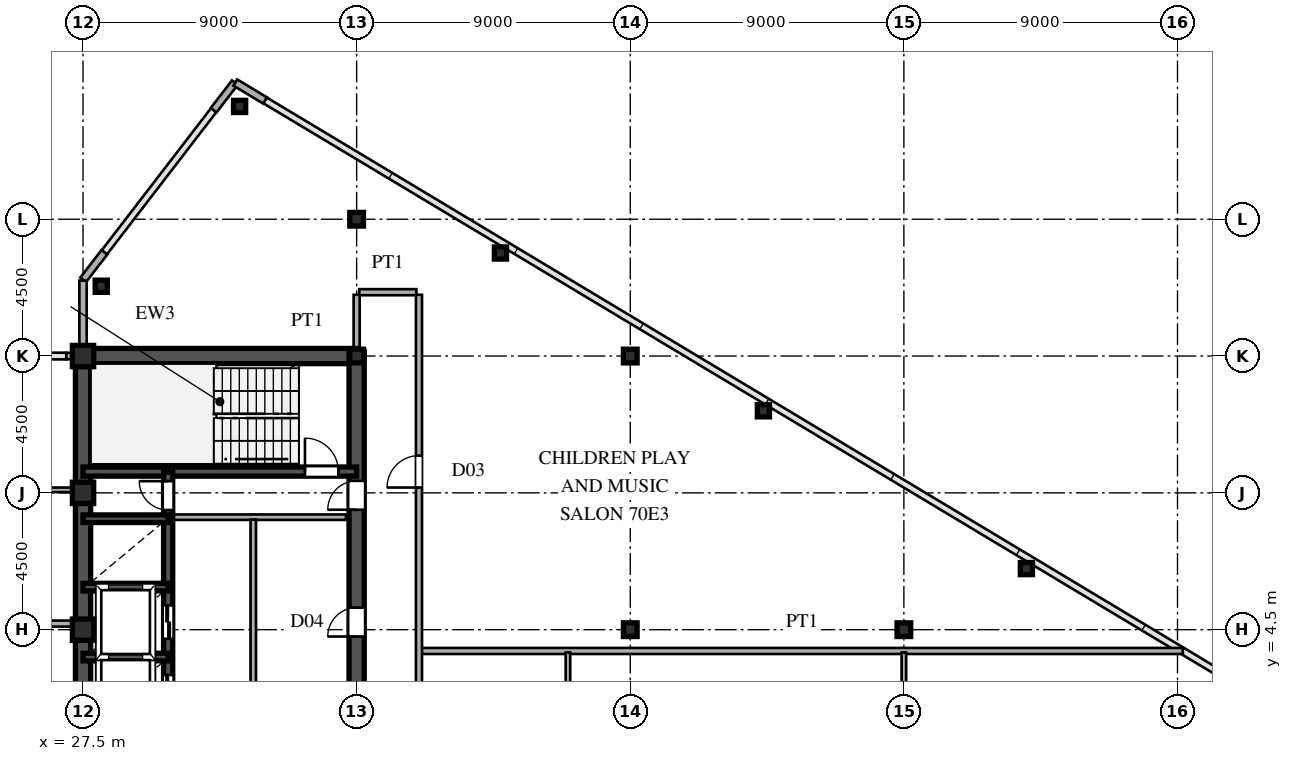
"""IFC4 building model, lengths in metres.
Left out: names, types, materials, properties, quantities, classifications, styles, units other than length and angle.
Written with IfcOpenShell. Run it as: python <this file> out.ifc"""

import sys

from ifc_helpers import new_model, si_unit, direction, frame, frame_2d, origin, origin_2d, place, context, subcontext, project, spatial, rectangle, hollow_rectangle, i_section, extrude, source, transform, mapped, element, fill, save


model = new_model("IFC4")
c1 = context("Model", 3, precision=1e-05, world=origin(), true_north=direction((0.0, 1.0)))
c2 = subcontext(c1, "Body", "Model", "MODEL_VIEW")
j1 = project(units=[si_unit("LENGTHUNIT", "METRE"), si_unit("PLANEANGLEUNIT", "RADIAN")], contexts=[c1])
p1 = place(None, origin())
s1 = spatial("IfcSite", under=j1, at=p1, CompositionType="ELEMENT")
p2 = place(p1, origin())
s2 = spatial("IfcBuilding", under=s1, at=p2, CompositionType="ELEMENT")
p3 = place(p2, frame((0.0, 0.0, 265.65)))
s3 = spatial("IfcBuildingStorey", under=s2, at=p3, CompositionType="ELEMENT", Elevation=265.65)
m1 = source(origin(), c2, "Body", "SweptSolid", [
    extrude(hollow_rectangle(XDim=0.7, YDim=0.7, WallThickness=0.03, at=origin_2d()), origin(), (0.0, 0.0, 1.0), 3.75),
])
for number, where, z_axis, x_axis in (
    (1, (27.5, 4.5, 0.0), (0.0, 0.0, 1.0), (1.0, 0.0, 0.0)),
    (2, (27.5, 9.0, 0.0), (0.0, 0.0, 1.0), (1.0, 0.0, 0.0)),
    (3, (27.5, 13.5, 0.0), (0.0, 0.0, 1.0), (1.0, 0.0, 0.0)),
):
    element("IfcColumn", number, at=place(p3, frame(where, z_axis=z_axis, x_axis=x_axis)), inside=s3, PredefinedType="COLUMN", context=c2, shape_type="MappedRepresentation", body=[
        mapped(m1, transform((0.0, 0.0, 0.0), scale=1.0)),
    ])
m2 = source(origin(), c2, "Body", "SweptSolid", [
    extrude(i_section(OverallWidth=0.45, OverallDepth=0.45, WebThickness=0.016, FlangeThickness=0.025, at=origin_2d()), origin(), (0.0, 0.0, 1.0), 3.75),
])
for number, where, z_axis, x_axis in (
    (4, (36.5, 13.5, 0.0), (0.0, 0.0, 1.0), (1.0, 0.0, 0.0)),
    (5, (36.5, 18.0, 0.0), (0.0, 0.0, 1.0), (1.0, 0.0, 0.0)),
    (6, (45.5, 4.5, 0.0), (0.0, 0.0, 1.0), (1.0, 0.0, 0.0)),
    (7, (45.5, 13.5, 0.0), (0.0, 0.0, 1.0), (1.0, 0.0, 0.0)),
    (8, (54.5, 4.5, 0.0), (0.0, 0.0, 1.0), (1.0, 0.0, 0.0)),
):
    element("IfcColumn", number, at=place(p3, frame(where, z_axis=z_axis, x_axis=x_axis)), inside=s3, PredefinedType="COLUMN", context=c2, shape_type="MappedRepresentation", body=[
        mapped(m2, transform((0.0, 0.0, 0.0), scale=1.0)),
    ])
m3 = source(origin(), c2, "Body", "SweptSolid", [
    extrude(hollow_rectangle(XDim=0.4, YDim=0.4, WallThickness=0.016, at=origin_2d()), origin(), (0.0, 0.0, 1.0), 3.75),
])
for number, where, z_axis, x_axis in (
    (9, (32.65, 21.71, 0.0), (0.0, 0.0, 1.0), (1.0, 0.0, 0.0)),
    (10, (28.1, 15.796, 0.0), (0.0, 0.0, 1.0), (1.0, 0.0, 0.0)),
    (11, (41.23, 16.889, 0.0), (0.0, 0.0, 1.0), (1.0, 0.0, 0.0)),
    (12, (49.88, 11.699, 0.0), (0.0, 0.0, 1.0), (1.0, 0.0, 0.0)),
    (13, (58.53, 6.509, 0.0), (0.0, 0.0, 1.0), (1.0, 0.0, 0.0)),
):
    element("IfcColumn", number, at=place(p3, frame(where, z_axis=z_axis, x_axis=x_axis)), inside=s3, PredefinedType="COLUMN", context=c2, shape_type="MappedRepresentation", body=[
        mapped(m3, transform((0.0, 0.0, 0.0), scale=1.0)),
    ])
for number, where, z_axis, x_axis in (
    (14, (33.486, 21.908, 0.0), (0.0, 0.0, 1.0), (-0.857, 0.515, 0.0)),
    (15, (32.494, 22.492, 0.0), (0.0, 0.0, 1.0), (-0.61, -0.793, 0.0)),
    (16, (28.201, 16.912, 0.0), (0.0, 0.0, 1.0), (-0.61, -0.793, 0.0)),
):
    element("IfcWall", number, at=place(p3, frame(where, z_axis=z_axis, x_axis=x_axis)), inside=s3, PredefinedType="SOLIDWALL", context=c2, shape_type="SweptSolid", body=[
        extrude(rectangle(XDim=1.14, YDim=0.24, at=frame_2d((0.57, 0.0))), origin(), (0.0, 0.0, 1.0), 3.49),
    ])
p4 = place(p3, frame((27.5, 13.755, 0.0), z_axis=(0.0, 0.0, 1.0), x_axis=(0.0, 1.0, 0.0)))
e17 = element("IfcWall", 17, at=p4, inside=s3, PredefinedType="SOLIDWALL", context=c2, shape_type="SweptSolid", body=[
    extrude(rectangle(XDim=0.62, YDim=0.24, at=frame_2d((0.31, 0.0))), origin(), (0.0, 0.0, 1.0), 2.99),
])
p5 = place(p3, frame((27.5, 14.375, 0.0), z_axis=(0.0, 0.0, 1.0), x_axis=(0.0, 1.0, 0.0)))
e18 = element("IfcWall", 18, at=p5, inside=s3, PredefinedType="SOLIDWALL", context=c2, shape_type="SweptSolid", body=[
    extrude(rectangle(XDim=1.605, YDim=0.24, at=frame_2d((0.803, 0.0))), origin(), (0.0, 0.0, 1.0), 3.49),
])
p6 = place(p3, frame((26.95, 13.5, 0.0), z_axis=(0.0, 0.0, 1.0), x_axis=(1.0, 0.0, 0.0)))
e19 = element("IfcWall", 19, at=p6, inside=s3, PredefinedType="SOLIDWALL", context=c2, shape_type="SweptSolid", body=[
    extrude(rectangle(XDim=0.54, YDim=0.21, at=frame_2d((0.27, 0.0))), origin(), (0.0, 0.0, 1.0), 2.99),
])
p7 = place(p3, frame((27.5, 1.3, 0.0), z_axis=(0.0, 0.0, 1.0), x_axis=(0.0, 1.0, 0.0)))
e20 = element("IfcWall", 20, at=p7, inside=s3, PredefinedType="SHEAR", context=c2, shape_type="SweptSolid", body=[
    extrude(rectangle(XDim=12.2, YDim=0.5, at=frame_2d((6.1, 0.0))), origin(), (0.0, 0.0, 1.0), 3.49),
])
p8 = place(p3, frame((27.5, 13.5, 0.0), z_axis=(0.0, 0.0, 1.0), x_axis=(1.0, 0.0, 0.0)))
e21 = element("IfcWall", 21, at=p8, inside=s3, PredefinedType="SHEAR", context=c2, shape_type="SweptSolid", body=[
    extrude(rectangle(XDim=9.0, YDim=0.5, at=frame_2d((4.5, 0.0))), origin(), (0.0, 0.0, 1.0), 3.49),
])
p9 = place(p3, frame((36.5, 8.2, 0.0), z_axis=(0.0, 0.0, 1.0), x_axis=(0.0, 1.0, 0.0)))
e22 = element("IfcWall", 22, at=p9, inside=s3, PredefinedType="SHEAR", context=c2, shape_type="SweptSolid", body=[
    extrude(rectangle(XDim=5.45, YDim=0.5, at=frame_2d((2.725, 0.0))), origin(), (0.0, 0.0, 1.0), 3.49),
])
p10 = place(p9, frame((0.245, 0.0, 0.0)))
e23 = element("IfcOpeningElement", 23, at=p10, cuts=e22, PredefinedType="OPENING", context=c2, shape_type="SweptSolid", body=[
    extrude(rectangle(XDim=0.95, YDim=2.15, at=frame_2d((0.475, 1.075))), frame((0.0, 0.26, 0.0), z_axis=(0.0, -1.0, 0.0), x_axis=(1.0, 0.0, 0.0)), (0.0, 0.0, 1.0), 0.52),
])
p11 = place(p3, frame((36.5, 1.3, 0.0), z_axis=(0.0, 0.0, 1.0), x_axis=(0.0, 1.0, 0.0)))
e24 = element("IfcWall", 24, at=p11, inside=s3, PredefinedType="SHEAR", context=c2, shape_type="SweptSolid", body=[
    extrude(rectangle(XDim=6.9, YDim=0.5, at=frame_2d((3.45, 0.0))), origin(), (0.0, 0.0, 1.0), 3.49),
])
p12 = place(p11, frame((2.975, 0.0, 0.0)))
e25 = element("IfcOpeningElement", 25, at=p12, cuts=e24, PredefinedType="OPENING", context=c2, shape_type="SweptSolid", body=[
    extrude(rectangle(XDim=0.95, YDim=2.15, at=frame_2d((0.475, 1.075))), frame((0.0, 0.26, 0.0), z_axis=(0.0, -1.0, 0.0), x_axis=(1.0, 0.0, 0.0)), (0.0, 0.0, 1.0), 0.52),
])
p13 = place(p3, frame((27.5, 9.7, 0.0), z_axis=(0.0, 0.0, 1.0), x_axis=(1.0, 0.0, 0.0)))
e26 = element("IfcWall", 26, at=p13, inside=s3, PredefinedType="SHEAR", context=c2, shape_type="SweptSolid", body=[
    extrude(rectangle(XDim=9.0, YDim=0.3, at=frame_2d((4.5, 0.0))), origin(), (0.0, 0.0, 1.0), 3.49),
])
p14 = place(p13, frame((7.3, 0.0, 0.0)))
e27 = element("IfcOpeningElement", 27, at=p14, cuts=e26, PredefinedType="OPENING", context=c2, shape_type="SweptSolid", body=[
    extrude(rectangle(XDim=1.1, YDim=2.2, at=frame_2d((0.55, 1.1))), frame((0.0, 0.16, 0.0), z_axis=(0.0, -1.0, 0.0), x_axis=(1.0, 0.0, 0.0)), (0.0, 0.0, 1.0), 0.32),
])
for number, where, z_axis, x_axis in (
    (28, (27.5, 3.6, 0.0), (0.0, 0.0, 1.0), (1.0, 0.0, 0.0)),
    (29, (27.5, 5.9, 0.0), (0.0, 0.0, 1.0), (1.0, 0.0, 0.0)),
    (30, (27.5, 8.15, 0.0), (0.0, 0.0, 1.0), (1.0, 0.0, 0.0)),
):
    element("IfcWall", number, at=place(p3, frame(where, z_axis=z_axis, x_axis=x_axis)), inside=s3, PredefinedType="SHEAR", context=c2, shape_type="SweptSolid", body=[
        extrude(rectangle(XDim=2.8, YDim=0.25, at=frame_2d((1.4, 0.0))), origin(), (0.0, 0.0, 1.0), 3.49),
    ])
p15 = place(p3, frame((30.3, 1.32, 0.0), z_axis=(0.0, 0.0, 1.0), x_axis=(0.0, 1.0, 0.0)))
e31 = element("IfcWall", 31, at=p15, inside=s3, PredefinedType="SHEAR", context=c2, shape_type="SweptSolid", body=[
    extrude(rectangle(XDim=2.28, YDim=0.3, at=frame_2d((1.14, 0.0))), origin(), (0.0, 0.0, 1.0), 3.49),
])
p16 = place(p15, frame((0.59, 0.0, 0.0)))
e32 = element("IfcOpeningElement", 32, at=p16, cuts=e31, PredefinedType="OPENING", context=c2, shape_type="SweptSolid", body=[
    extrude(rectangle(XDim=1.1, YDim=2.2, at=frame_2d((0.55, 1.1))), frame((0.0, 0.16, 0.0), z_axis=(0.0, -1.0, 0.0), x_axis=(1.0, 0.0, 0.0)), (0.0, 0.0, 1.0), 0.32),
])
p17 = place(p3, frame((30.3, 3.6, 0.0), z_axis=(0.0, 0.0, 1.0), x_axis=(0.0, 1.0, 0.0)))
e33 = element("IfcWall", 33, at=p17, inside=s3, PredefinedType="SHEAR", context=c2, shape_type="SweptSolid", body=[
    extrude(rectangle(XDim=2.3, YDim=0.3, at=frame_2d((1.15, 0.0))), origin(), (0.0, 0.0, 1.0), 3.49),
])
p18 = place(p17, frame((0.6, 0.0, 0.0)))
e34 = element("IfcOpeningElement", 34, at=p18, cuts=e33, PredefinedType="OPENING", context=c2, shape_type="SweptSolid", body=[
    extrude(rectangle(XDim=1.1, YDim=2.2, at=frame_2d((0.55, 1.1))), frame((0.0, 0.16, 0.0), z_axis=(0.0, -1.0, 0.0), x_axis=(1.0, 0.0, 0.0)), (0.0, 0.0, 1.0), 0.32),
])
p19 = place(p3, frame((30.3, 5.9, 0.0), z_axis=(0.0, 0.0, 1.0), x_axis=(0.0, 1.0, 0.0)))
e35 = element("IfcWall", 35, at=p19, inside=s3, PredefinedType="SHEAR", context=c2, shape_type="SweptSolid", body=[
    extrude(rectangle(XDim=2.25, YDim=0.3, at=frame_2d((1.125, 0.0))), origin(), (0.0, 0.0, 1.0), 3.49),
])
p20 = place(p3, frame((30.3, 8.15, 0.0), z_axis=(0.0, 0.0, 1.0), x_axis=(0.0, 1.0, 0.0)))
e36 = element("IfcWall", 36, at=p20, inside=s3, PredefinedType="SHEAR", context=c2, shape_type="SweptSolid", body=[
    extrude(rectangle(XDim=1.53, YDim=0.3, at=frame_2d((0.765, 0.0))), origin(), (0.0, 0.0, 1.0), 3.49),
])
p21 = place(p20, frame((0.285, 0.0, 0.0)))
e37 = element("IfcOpeningElement", 37, at=p21, cuts=e36, PredefinedType="OPENING", context=c2, shape_type="SweptSolid", body=[
    extrude(rectangle(XDim=0.95, YDim=2.15, at=frame_2d((0.475, 1.075))), frame((0.0, 0.16, 0.0), z_axis=(0.0, -1.0, 0.0), x_axis=(1.0, 0.0, 0.0)), (0.0, 0.0, 1.0), 0.32),
])
p22 = place(p3, frame((30.45, 8.2, 0.0), z_axis=(0.0, 0.0, 1.0), x_axis=(1.0, 0.0, 0.0)))
e38 = element("IfcWall", 38, at=p22, inside=s3, PredefinedType="PARTITIONING", context=c2, shape_type="SweptSolid", body=[
    extrude(rectangle(XDim=5.7, YDim=0.18, at=frame_2d((2.85, 0.0))), origin(), (0.0, 0.0, 1.0), 3.49),
])
p23 = place(p3, frame((33.1, 1.38, 0.0), z_axis=(0.0, 0.0, 1.0), x_axis=(0.0, 1.0, 0.0)))
e39 = element("IfcWall", 39, at=p23, inside=s3, PredefinedType="PARTITIONING", context=c2, shape_type="SweptSolid", body=[
    extrude(rectangle(XDim=6.74, YDim=0.18, at=frame_2d((3.37, 0.0))), origin(), (0.0, 0.0, 1.0), 3.49),
])
p24 = place(p3, frame((38.63, 3.8, 0.0), z_axis=(0.0, 0.0, 1.0), x_axis=(1.0, 0.0, 0.0)))
e40 = element("IfcWall", 40, at=p24, inside=s3, PredefinedType="PARTITIONING", context=c2, shape_type="SweptSolid", body=[
    extrude(rectangle(XDim=25.046, YDim=0.2, at=frame_2d((12.523, 0.0))), origin(), (0.0, 0.0, 1.0), 3.49),
])
p25 = place(p3, frame((-27.245, 4.7, 0.0), z_axis=(0.0, 0.0, 1.0), x_axis=(1.0, 0.0, 0.0)))
e41 = element("IfcWall", 41, at=p25, inside=s3, PredefinedType="PARTITIONING", context=c2, shape_type="SweptSolid", body=[
    extrude(rectangle(XDim=54.49, YDim=0.2, at=frame_2d((27.245, 0.0))), origin(), (0.0, 0.0, 1.0), 3.49),
])
p26 = place(p25, frame((22.47, 0.0, 0.0)))
e42 = element("IfcOpeningElement", 42, at=p26, cuts=e41, PredefinedType="OPENING", context=c2, shape_type="SweptSolid", body=[
    extrude(rectangle(XDim=1.05, YDim=2.25, at=frame_2d((0.525, 1.125))), frame((0.0, 0.11, 0.0), z_axis=(0.0, -1.0, 0.0), x_axis=(1.0, 0.0, 0.0)), (0.0, 0.0, 1.0), 0.22),
])
p27 = place(p3, frame((4.585, 9.1, 0.0), z_axis=(0.0, 0.0, 1.0), x_axis=(1.0, 0.0, 0.0)))
e43 = element("IfcWall", 43, at=p27, inside=s3, PredefinedType="PARTITIONING", context=c2, shape_type="SweptSolid", body=[
    extrude(rectangle(XDim=22.66, YDim=0.15, at=frame_2d((11.33, 0.0))), origin(), (0.0, 0.0, 1.0), 3.49),
])
p28 = place(p27, frame((3.94, 0.0, 0.0)))
e44 = element("IfcOpeningElement", 44, at=p28, cuts=e43, PredefinedType="OPENING", context=c2, shape_type="SweptSolid", body=[
    extrude(rectangle(XDim=0.95, YDim=2.15, at=frame_2d((0.475, 1.075))), frame((0.0, 0.085, 0.0), z_axis=(0.0, -1.0, 0.0), x_axis=(1.0, 0.0, 0.0)), (0.0, 0.0, 1.0), 0.17),
])
p29 = place(p27, frame((11.94, 0.0, 0.0)))
e45 = element("IfcOpeningElement", 45, at=p29, cuts=e43, PredefinedType="OPENING", context=c2, shape_type="SweptSolid", body=[
    extrude(rectangle(XDim=0.95, YDim=2.15, at=frame_2d((0.475, 1.075))), frame((0.0, 0.085, 0.0), z_axis=(0.0, -1.0, 0.0), x_axis=(1.0, 0.0, 0.0)), (0.0, 0.0, 1.0), 0.17),
])
p30 = place(p27, frame((18.94, 0.0, 0.0)))
e46 = element("IfcOpeningElement", 46, at=p30, cuts=e43, PredefinedType="OPENING", context=c2, shape_type="SweptSolid", body=[
    extrude(rectangle(XDim=0.95, YDim=2.15, at=frame_2d((0.475, 1.075))), frame((0.0, 0.085, 0.0), z_axis=(0.0, -1.0, 0.0), x_axis=(1.0, 0.0, 0.0)), (0.0, 0.0, 1.0), 0.17),
])
p31 = place(p3, frame((36.585, 15.6, 0.0), z_axis=(0.0, 0.0, 1.0), x_axis=(1.0, 0.0, 0.0)))
e47 = element("IfcWall", 47, at=p31, inside=s3, PredefinedType="PARTITIONING", context=c2, shape_type="SweptSolid", body=[
    extrude(rectangle(XDim=1.88, YDim=0.2, at=frame_2d((0.94, 0.0))), origin(), (0.0, 0.0, 1.0), 3.49),
])
p32 = place(p3, frame((36.5, 13.755, 0.0), z_axis=(0.0, 0.0, 1.0), x_axis=(0.0, 1.0, 0.0)))
e48 = element("IfcWall", 48, at=p32, inside=s3, PredefinedType="PARTITIONING", context=c2, shape_type="SweptSolid", body=[
    extrude(rectangle(XDim=1.76, YDim=0.2, at=frame_2d((0.88, 0.0))), origin(), (0.0, 0.0, 1.0), 2.89),
])
p33 = place(p3, frame((38.55, -15.515, 0.0), z_axis=(0.0, 0.0, 1.0), x_axis=(0.0, 1.0, 0.0)))
e49 = element("IfcWall", 49, at=p33, inside=s3, PredefinedType="PARTITIONING", context=c2, shape_type="SweptSolid", body=[
    extrude(rectangle(XDim=31.03, YDim=0.2, at=frame_2d((15.515, 0.0))), origin(), (0.0, 0.0, 1.0), 3.49),
])
p34 = place(p33, frame((2.39, 0.0, 0.0)))
e50 = element("IfcOpeningElement", 50, at=p34, cuts=e49, PredefinedType="OPENING", context=c2, shape_type="SweptSolid", body=[
    extrude(rectangle(XDim=1.05, YDim=2.25, at=frame_2d((0.525, 1.125))), frame((0.0, 0.11, 0.0), z_axis=(0.0, -1.0, 0.0), x_axis=(1.0, 0.0, 0.0)), (0.0, 0.0, 1.0), 0.22),
])
p35 = place(p33, frame((11.889, 0.0, 0.0)))
e51 = element("IfcOpeningElement", 51, at=p35, cuts=e49, PredefinedType="OPENING", context=c2, shape_type="SweptSolid", body=[
    extrude(rectangle(XDim=1.05, YDim=2.25, at=frame_2d((0.525, 1.125))), frame((0.0, 0.11, 0.0), z_axis=(0.0, -1.0, 0.0), x_axis=(1.0, 0.0, 0.0)), (0.0, 0.0, 1.0), 0.22),
])
p36 = place(p33, frame((24.69, 0.0, 0.0)))
e52 = element("IfcOpeningElement", 52, at=p36, cuts=e49, PredefinedType="OPENING", context=c2, shape_type="SweptSolid", body=[
    extrude(rectangle(XDim=1.05, YDim=2.25, at=frame_2d((0.525, 1.125))), frame((0.0, 0.11, 0.0), z_axis=(0.0, -1.0, 0.0), x_axis=(1.0, 0.0, 0.0)), (0.0, 0.0, 1.0), 0.22),
])
p37 = place(p3, frame((43.45, -0.168, 0.0), z_axis=(0.0, 0.0, 1.0), x_axis=(0.0, 1.0, 0.0)))
e53 = element("IfcWall", 53, at=p37, inside=s3, PredefinedType="PARTITIONING", context=c2, shape_type="SweptSolid", body=[
    extrude(rectangle(XDim=3.918, YDim=0.15, at=frame_2d((1.959, 0.0))), origin(), (0.0, 0.0, 1.0), 3.49),
])
p38 = place(p3, frame((54.5, -9.335, 0.0), z_axis=(0.0, 0.0, 1.0), x_axis=(0.0, 1.0, 0.0)))
e54 = element("IfcWall", 54, at=p38, inside=s3, PredefinedType="PARTITIONING", context=c2, shape_type="SweptSolid", body=[
    extrude(rectangle(XDim=13.085, YDim=0.15, at=frame_2d((6.542, 0.0))), origin(), (0.0, 0.0, 1.0), 2.89),
])
p39 = place(p38, frame((5.96, 0.0, 0.0)))
e55 = element("IfcOpeningElement", 55, at=p39, cuts=e54, PredefinedType="OPENING", context=c2, shape_type="SweptSolid", body=[
    extrude(rectangle(XDim=0.95, YDim=2.15, at=frame_2d((0.475, 1.075))), frame((0.0, 0.085, 0.0), z_axis=(0.0, -1.0, 0.0), x_axis=(1.0, 0.0, 0.0)), (0.0, 0.0, 1.0), 0.17),
])
p40 = place(p38, frame((1.643, 0.0, 0.0)))
e56 = element("IfcOpeningElement", 56, at=p40, cuts=e54, PredefinedType="OPENING", context=c2, shape_type="SweptSolid", body=[
    extrude(rectangle(XDim=0.95, YDim=2.15, at=frame_2d((0.475, 1.075))), frame((0.0, 0.085, 0.0), z_axis=(0.0, -1.0, 0.0), x_axis=(1.0, 0.0, 0.0)), (0.0, 0.0, 1.0), 0.17),
])
p41 = place(p38, frame((10.427, 0.0, 0.0)))
e57 = element("IfcOpeningElement", 57, at=p41, cuts=e54, PredefinedType="OPENING", context=c2, shape_type="SweptSolid", body=[
    extrude(rectangle(XDim=0.95, YDim=2.15, at=frame_2d((0.475, 1.075))), frame((0.0, 0.085, 0.0), z_axis=(0.0, -1.0, 0.0), x_axis=(1.0, 0.0, 0.0)), (0.0, 0.0, 1.0), 0.17),
])
m4 = source(origin(), c2, "Body", "SweptSolid", [
    extrude(rectangle(XDim=0.95, YDim=2.15, at=frame_2d((0.475, 1.075))), frame((0.0, 0.025, 0.0), z_axis=(0.0, -1.0, 0.0), x_axis=(1.0, 0.0, 0.0)), (0.0, 0.0, 1.0), 0.05),
])
p42 = place(p10, origin())
e58 = element("IfcDoor", 58, at=p42, inside=s3, OperationType="SINGLE_SWING_LEFT", PredefinedType="DOOR", context=c2, shape_type="MappedRepresentation", body=[
    mapped(m4, transform((0.0, 0.0, 0.0), scale=1.0)),
])
fill(e23, e58)
p43 = place(p12, origin())
e59 = element("IfcDoor", 59, at=p43, inside=s3, OperationType="SINGLE_SWING_LEFT", PredefinedType="DOOR", context=c2, shape_type="MappedRepresentation", body=[
    mapped(m4, transform((0.0, 0.0, 0.0), scale=1.0)),
])
fill(e25, e59)
m5 = source(origin(), c2, "Body", "SweptSolid", [
    extrude(rectangle(XDim=1.1, YDim=2.2, at=frame_2d((0.55, 1.1))), frame((0.0, 0.025, 0.0), z_axis=(0.0, -1.0, 0.0), x_axis=(1.0, 0.0, 0.0)), (0.0, 0.0, 1.0), 0.05),
])
p44 = place(p14, origin())
e60 = element("IfcDoor", 60, at=p44, inside=s3, OperationType="SINGLE_SWING_LEFT", PredefinedType="DOOR", context=c2, shape_type="MappedRepresentation", body=[
    mapped(m5, transform((0.0, 0.0, 0.0), scale=1.0)),
])
fill(e27, e60)
m6 = source(origin(), c2, "Body", "SweptSolid", [
    extrude(rectangle(XDim=1.1, YDim=2.2, at=frame_2d((0.55, 1.1))), frame((0.0, 0.025, 0.0), z_axis=(0.0, -1.0, 0.0), x_axis=(1.0, 0.0, 0.0)), (0.0, 0.0, 1.0), 0.05),
])
p45 = place(p16, origin())
e61 = element("IfcDoor", 61, at=p45, inside=s3, OperationType="DOUBLE_DOOR_SLIDING", PredefinedType="DOOR", context=c2, shape_type="MappedRepresentation", body=[
    mapped(m6, transform((0.0, 0.0, 0.0), scale=1.0)),
])
fill(e32, e61)
p46 = place(p18, origin())
e62 = element("IfcDoor", 62, at=p46, inside=s3, OperationType="DOUBLE_DOOR_SLIDING", PredefinedType="DOOR", context=c2, shape_type="MappedRepresentation", body=[
    mapped(m6, transform((0.0, 0.0, 0.0), scale=1.0)),
])
fill(e34, e62)
p47 = place(p21, origin())
e63 = element("IfcDoor", 63, at=p47, inside=s3, OperationType="SINGLE_SWING_RIGHT", PredefinedType="DOOR", context=c2, shape_type="MappedRepresentation", body=[
    mapped(m4, transform((0.0, 0.0, 0.0), scale=1.0)),
])
fill(e37, e63)
m7 = source(origin(), c2, "Body", "SweptSolid", [
    extrude(rectangle(XDim=1.05, YDim=2.25, at=frame_2d((0.525, 1.125))), frame((0.0, 0.025, 0.0), z_axis=(0.0, -1.0, 0.0), x_axis=(1.0, 0.0, 0.0)), (0.0, 0.0, 1.0), 0.05),
])
p48 = place(p36, origin())
e64 = element("IfcDoor", 64, at=p48, inside=s3, OperationType="SINGLE_SWING_LEFT", PredefinedType="DOOR", context=c2, shape_type="MappedRepresentation", body=[
    mapped(m7, transform((0.0, 0.0, 0.0), scale=1.0)),
])
fill(e52, e64)
save(model, sys.argv[1])
